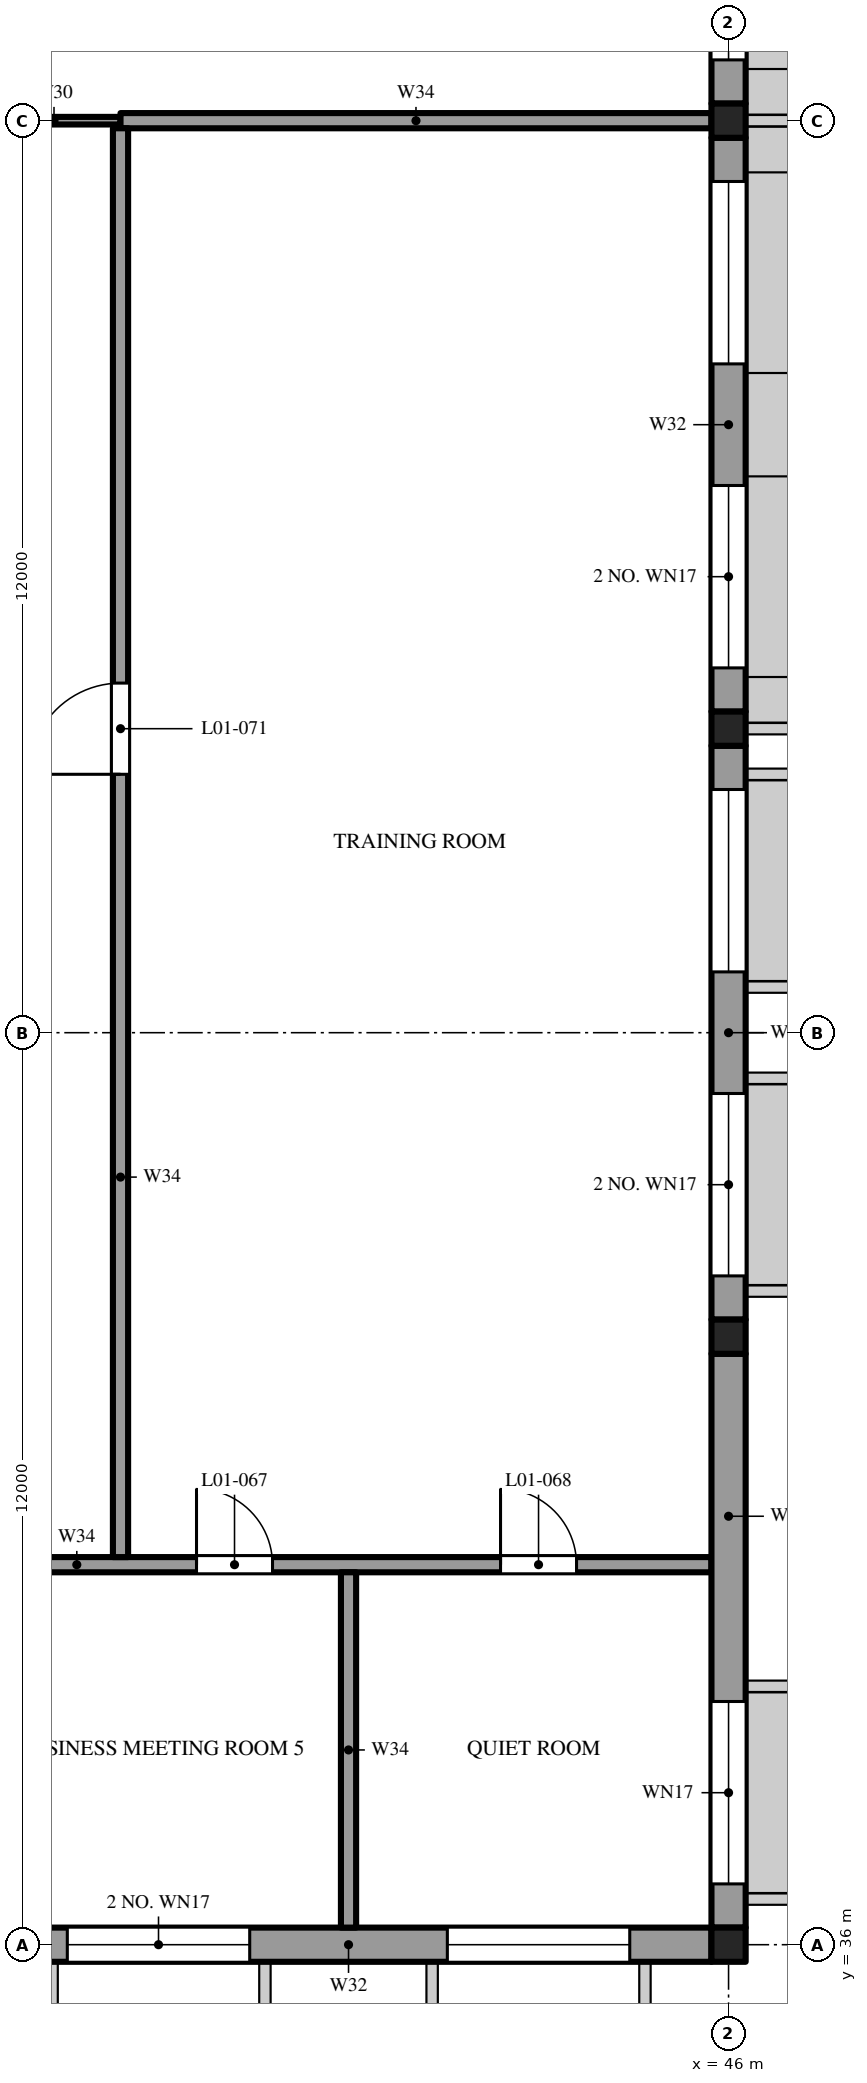
"""IFC4 building model, lengths in metres.
Left out: names, types, materials, properties, quantities, classifications, styles, units other than length and angle.
Written with IfcOpenShell. Run it as: python <this file> out.ifc"""

import sys

from ifc_helpers import new_model, si_unit, direction, frame, frame_2d, origin, origin_2d, place, context, subcontext, project, spatial, rectangle, extrude, element, fill, save


model = new_model("IFC4")
c1 = context("Model", 3, precision=1e-05, world=origin(), true_north=direction((0.0, 1.0)))
c2 = subcontext(c1, "Body", "Model", "MODEL_VIEW")
j1 = project(units=[si_unit("LENGTHUNIT", "METRE"), si_unit("PLANEANGLEUNIT", "RADIAN")], contexts=[c1])
p1 = place(None, origin())
s1 = spatial("IfcSite", under=j1, at=p1, CompositionType="ELEMENT")
p2 = place(p1, origin())
s2 = spatial("IfcBuilding", under=s1, at=p2, CompositionType="ELEMENT")
p3 = place(p2, frame((0.0, 0.0, 7.2)))
s3 = spatial("IfcBuildingStorey", under=s2, at=p3, CompositionType="ELEMENT", Elevation=7.2)
for number, where, z_axis, x_axis in (
    (1, (46.0, 36.0, 0.0), (0.0, 0.0, 1.0), (1.0, 0.0, 0.0)),
    (2, (46.0, 44.0, 0.0), (0.0, 0.0, 1.0), (1.0, 0.0, 0.0)),
    (3, (46.0, 52.0, 0.0), (0.0, 0.0, 1.0), (1.0, 0.0, 0.0)),
    (4, (46.0, 60.0, 0.0), (0.0, 0.0, 1.0), (1.0, 0.0, 0.0)),
):
    element("IfcColumn", number, at=place(p3, frame(where, z_axis=z_axis, x_axis=x_axis)), inside=s3, PredefinedType="COLUMN", context=c2, shape_type="SweptSolid", body=[
        extrude(rectangle(XDim=0.45, YDim=0.45, at=origin_2d()), origin(), (0.0, 0.0, 1.0), 4.8),
    ])
p4 = place(p3, frame((36.225, 36.0, 0.0), z_axis=(0.0, 0.0, 1.0), x_axis=(1.0, 0.0, 0.0)))
e5 = element("IfcWall", 5, at=p4, inside=s3, PredefinedType="SOLIDWALL", context=c2, shape_type="SweptSolid", body=[
    extrude(rectangle(XDim=9.55, YDim=0.45, at=frame_2d((4.775, 0.0))), origin(), (0.0, 0.0, 1.0), 4.45),
])
p5 = place(p4, frame((1.075, 0.0, 0.9)))
e6 = element("IfcOpeningElement", 6, at=p5, cuts=e5, PredefinedType="OPENING", context=c2, shape_type="SweptSolid", body=[
    extrude(rectangle(XDim=2.4, YDim=2.2, at=frame_2d((1.2, 1.1))), frame((0.0, 0.235, 0.0), z_axis=(0.0, -1.0, 0.0), x_axis=(1.0, 0.0, 0.0)), (0.0, 0.0, 1.0), 0.47),
])
p6 = place(p4, frame((6.075, 0.0, 0.9)))
e7 = element("IfcOpeningElement", 7, at=p6, cuts=e5, PredefinedType="OPENING", context=c2, shape_type="SweptSolid", body=[
    extrude(rectangle(XDim=2.4, YDim=2.2, at=frame_2d((1.2, 1.1))), frame((0.0, 0.235, 0.0), z_axis=(0.0, -1.0, 0.0), x_axis=(1.0, 0.0, 0.0)), (0.0, 0.0, 1.0), 0.47),
])
p7 = place(p3, frame((36.15, 41.0, 0.0), z_axis=(0.0, 0.0, 1.0), x_axis=(1.0, 0.0, 0.0)))
e8 = element("IfcWall", 8, at=p7, inside=s3, PredefinedType="PARTITIONING", context=c2, shape_type="SweptSolid", body=[
    extrude(rectangle(XDim=9.625, YDim=0.2, at=frame_2d((4.812, 0.0))), origin(), (0.0, 0.0, 1.0), 4.45),
])
p8 = place(p7, frame((2.85, 0.0, 0.0)))
e9 = element("IfcOpeningElement", 9, at=p8, cuts=e8, PredefinedType="OPENING", context=c2, shape_type="SweptSolid", body=[
    extrude(rectangle(XDim=1.0, YDim=2.1, at=frame_2d((0.5, 1.05))), frame((0.0, 0.11, 0.0), z_axis=(0.0, -1.0, 0.0), x_axis=(1.0, 0.0, 0.0)), (0.0, 0.0, 1.0), 0.22),
])
p9 = place(p7, frame((6.85, 0.0, 0.0)))
e10 = element("IfcOpeningElement", 10, at=p9, cuts=e8, PredefinedType="OPENING", context=c2, shape_type="SweptSolid", body=[
    extrude(rectangle(XDim=1.0, YDim=2.1, at=frame_2d((0.5, 1.05))), frame((0.0, 0.11, 0.0), z_axis=(0.0, -1.0, 0.0), x_axis=(1.0, 0.0, 0.0)), (0.0, 0.0, 1.0), 0.22),
])
p10 = place(p3, frame((36.25, 60.0, 0.0), z_axis=(0.0, 0.0, 1.0), x_axis=(1.0, 0.0, 0.0)))
e11 = element("IfcWall", 11, at=p10, inside=s3, PredefinedType="PARTITIONING", context=c2, shape_type="SweptSolid", body=[
    extrude(rectangle(XDim=1.75, YDim=0.1, at=frame_2d((0.875, 0.0))), origin(), (0.0, 0.0, 1.0), 4.45),
])
p11 = place(p3, frame((38.0, 60.0, 0.0), z_axis=(0.0, 0.0, 1.0), x_axis=(1.0, 0.0, 0.0)))
e12 = element("IfcWall", 12, at=p11, inside=s3, PredefinedType="PARTITIONING", context=c2, shape_type="SweptSolid", body=[
    extrude(rectangle(XDim=7.775, YDim=0.2, at=frame_2d((3.887, 0.0))), origin(), (0.0, 0.0, 1.0), 4.45),
])
p12 = place(p3, frame((38.0, 41.1, 0.0), z_axis=(0.0, 0.0, 1.0), x_axis=(0.0, 1.0, 0.0)))
e13 = element("IfcWall", 13, at=p12, inside=s3, PredefinedType="PARTITIONING", context=c2, shape_type="SweptSolid", body=[
    extrude(rectangle(XDim=18.8, YDim=0.2, at=frame_2d((9.4, 0.0))), origin(), (0.0, 0.0, 1.0), 4.45),
])
p13 = place(p12, frame((10.3, 0.0, 0.0)))
e14 = element("IfcOpeningElement", 14, at=p13, cuts=e13, PredefinedType="OPENING", context=c2, shape_type="SweptSolid", body=[
    extrude(rectangle(XDim=1.2, YDim=2.1, at=frame_2d((0.6, 1.05))), frame((0.0, 0.11, 0.0), z_axis=(0.0, -1.0, 0.0), x_axis=(1.0, 0.0, 0.0)), (0.0, 0.0, 1.0), 0.22),
])
p14 = place(p3, frame((41.0, 36.225, 0.0), z_axis=(0.0, 0.0, 1.0), x_axis=(0.0, 1.0, 0.0)))
e15 = element("IfcWall", 15, at=p14, inside=s3, PredefinedType="PARTITIONING", context=c2, shape_type="SweptSolid", body=[
    extrude(rectangle(XDim=4.675, YDim=0.2, at=frame_2d((2.337, 0.0))), origin(), (0.0, 0.0, 1.0), 4.45),
])
p15 = place(p3, frame((46.0, 36.225, 0.0), z_axis=(0.0, 0.0, 1.0), x_axis=(0.0, 1.0, 0.0)))
e16 = element("IfcWall", 16, at=p15, inside=s3, PredefinedType="SOLIDWALL", context=c2, shape_type="SweptSolid", body=[
    extrude(rectangle(XDim=7.55, YDim=0.45, at=frame_2d((3.775, 0.0))), origin(), (0.0, 0.0, 1.0), 4.45),
])
p16 = place(p15, frame((0.575, 0.0, 0.9)))
e17 = element("IfcOpeningElement", 17, at=p16, cuts=e16, PredefinedType="OPENING", context=c2, shape_type="SweptSolid", body=[
    extrude(rectangle(XDim=2.4, YDim=2.2, at=frame_2d((1.2, 1.1))), frame((0.0, 0.235, 0.0), z_axis=(0.0, -1.0, 0.0), x_axis=(1.0, 0.0, 0.0)), (0.0, 0.0, 1.0), 0.47),
])
p17 = place(p3, frame((46.0, 44.225, 0.0), z_axis=(0.0, 0.0, 1.0), x_axis=(0.0, 1.0, 0.0)))
e18 = element("IfcWall", 18, at=p17, inside=s3, PredefinedType="SOLIDWALL", context=c2, shape_type="SweptSolid", body=[
    extrude(rectangle(XDim=7.55, YDim=0.45, at=frame_2d((3.775, 0.0))), origin(), (0.0, 0.0, 1.0), 4.45),
])
p18 = place(p17, frame((0.575, 0.0, 0.9)))
e19 = element("IfcOpeningElement", 19, at=p18, cuts=e18, PredefinedType="OPENING", context=c2, shape_type="SweptSolid", body=[
    extrude(rectangle(XDim=2.4, YDim=2.2, at=frame_2d((1.2, 1.1))), frame((0.0, 0.235, 0.0), z_axis=(0.0, -1.0, 0.0), x_axis=(1.0, 0.0, 0.0)), (0.0, 0.0, 1.0), 0.47),
])
p19 = place(p17, frame((4.575, 0.0, 0.9)))
e20 = element("IfcOpeningElement", 20, at=p19, cuts=e18, PredefinedType="OPENING", context=c2, shape_type="SweptSolid", body=[
    extrude(rectangle(XDim=2.4, YDim=2.2, at=frame_2d((1.2, 1.1))), frame((0.0, 0.235, 0.0), z_axis=(0.0, -1.0, 0.0), x_axis=(1.0, 0.0, 0.0)), (0.0, 0.0, 1.0), 0.47),
])
p20 = place(p3, frame((46.0, 52.225, 0.0), z_axis=(0.0, 0.0, 1.0), x_axis=(0.0, 1.0, 0.0)))
e21 = element("IfcWall", 21, at=p20, inside=s3, PredefinedType="SOLIDWALL", context=c2, shape_type="SweptSolid", body=[
    extrude(rectangle(XDim=7.55, YDim=0.45, at=frame_2d((3.775, 0.0))), origin(), (0.0, 0.0, 1.0), 4.45),
])
p21 = place(p20, frame((0.575, 0.0, 0.9)))
e22 = element("IfcOpeningElement", 22, at=p21, cuts=e21, PredefinedType="OPENING", context=c2, shape_type="SweptSolid", body=[
    extrude(rectangle(XDim=2.4, YDim=2.2, at=frame_2d((1.2, 1.1))), frame((0.0, 0.235, 0.0), z_axis=(0.0, -1.0, 0.0), x_axis=(1.0, 0.0, 0.0)), (0.0, 0.0, 1.0), 0.47),
])
p22 = place(p20, frame((4.575, 0.0, 0.9)))
e23 = element("IfcOpeningElement", 23, at=p22, cuts=e21, PredefinedType="OPENING", context=c2, shape_type="SweptSolid", body=[
    extrude(rectangle(XDim=2.4, YDim=2.2, at=frame_2d((1.2, 1.1))), frame((0.0, 0.235, 0.0), z_axis=(0.0, -1.0, 0.0), x_axis=(1.0, 0.0, 0.0)), (0.0, 0.0, 1.0), 0.47),
])
p23 = place(p3, frame((46.0, 60.225, 0.0), z_axis=(0.0, 0.0, 1.0), x_axis=(0.0, 1.0, 0.0)))
e24 = element("IfcWall", 24, at=p23, inside=s3, PredefinedType="SOLIDWALL", context=c2, shape_type="SweptSolid", body=[
    extrude(rectangle(XDim=7.55, YDim=0.45, at=frame_2d((3.775, 0.0))), origin(), (0.0, 0.0, 1.0), 4.45),
])
p24 = place(p23, frame((0.575, 0.0, 0.9)))
e25 = element("IfcOpeningElement", 25, at=p24, cuts=e24, PredefinedType="OPENING", context=c2, shape_type="SweptSolid", body=[
    extrude(rectangle(XDim=2.4, YDim=2.2, at=frame_2d((1.2, 1.1))), frame((0.0, 0.235, 0.0), z_axis=(0.0, -1.0, 0.0), x_axis=(1.0, 0.0, 0.0)), (0.0, 0.0, 1.0), 0.47),
])
p25 = place(p23, frame((4.575, 0.0, 0.9)))
e26 = element("IfcOpeningElement", 26, at=p25, cuts=e24, PredefinedType="OPENING", context=c2, shape_type="SweptSolid", body=[
    extrude(rectangle(XDim=2.4, YDim=2.2, at=frame_2d((1.2, 1.1))), frame((0.0, 0.235, 0.0), z_axis=(0.0, -1.0, 0.0), x_axis=(1.0, 0.0, 0.0)), (0.0, 0.0, 1.0), 0.47),
])
p26 = place(p8, origin())
e27 = element("IfcDoor", 27, at=p26, inside=s3, OperationType="SINGLE_SWING_RIGHT", PredefinedType="DOOR", context=c2, shape_type="SweptSolid", body=[
    extrude(rectangle(XDim=1.0, YDim=2.1, at=frame_2d((0.5, 1.05))), frame((0.0, 0.025, 0.0), z_axis=(0.0, -1.0, 0.0), x_axis=(1.0, 0.0, 0.0)), (0.0, 0.0, 1.0), 0.05),
])
fill(e9, e27)
p27 = place(p9, origin())
e28 = element("IfcDoor", 28, at=p27, inside=s3, OperationType="SINGLE_SWING_LEFT", PredefinedType="DOOR", context=c2, shape_type="SweptSolid", body=[
    extrude(rectangle(XDim=1.0, YDim=2.1, at=frame_2d((0.5, 1.05))), frame((0.0, 0.025, 0.0), z_axis=(0.0, -1.0, 0.0), x_axis=(1.0, 0.0, 0.0)), (0.0, 0.0, 1.0), 0.05),
])
fill(e10, e28)
p28 = place(p13, origin())
e29 = element("IfcDoor", 29, at=p28, inside=s3, OperationType="SINGLE_SWING_RIGHT", PredefinedType="DOOR", context=c2, shape_type="SweptSolid", body=[
    extrude(rectangle(XDim=1.2, YDim=2.1, at=frame_2d((0.6, 1.05))), frame((0.0, 0.025, 0.0), z_axis=(0.0, -1.0, 0.0), x_axis=(1.0, 0.0, 0.0)), (0.0, 0.0, 1.0), 0.05),
])
fill(e14, e29)
p29 = place(p5, origin())
e30 = element("IfcWindow", 30, at=p29, inside=s3, PartitioningType="SINGLE_PANEL", PredefinedType="WINDOW", context=c2, shape_type="SweptSolid", body=[
    extrude(rectangle(XDim=2.4, YDim=2.2, at=frame_2d((1.2, 1.1))), frame((0.0, 0.215, 0.0), z_axis=(0.0, -1.0, 0.0), x_axis=(1.0, 0.0, 0.0)), (0.0, 0.0, 1.0), 0.06),
])
fill(e6, e30)
p30 = place(p6, origin())
e31 = element("IfcWindow", 31, at=p30, inside=s3, PartitioningType="SINGLE_PANEL", PredefinedType="WINDOW", context=c2, shape_type="SweptSolid", body=[
    extrude(rectangle(XDim=2.4, YDim=2.2, at=frame_2d((1.2, 1.1))), frame((0.0, 0.215, 0.0), z_axis=(0.0, -1.0, 0.0), x_axis=(1.0, 0.0, 0.0)), (0.0, 0.0, 1.0), 0.06),
])
fill(e7, e31)
p31 = place(p16, origin())
e32 = element("IfcWindow", 32, at=p31, inside=s3, PartitioningType="SINGLE_PANEL", PredefinedType="WINDOW", context=c2, shape_type="SweptSolid", body=[
    extrude(rectangle(XDim=2.4, YDim=2.2, at=frame_2d((1.2, 1.1))), frame((0.0, 0.215, 0.0), z_axis=(0.0, -1.0, 0.0), x_axis=(1.0, 0.0, 0.0)), (0.0, 0.0, 1.0), 0.06),
])
fill(e17, e32)
p32 = place(p18, origin())
e33 = element("IfcWindow", 33, at=p32, inside=s3, PartitioningType="SINGLE_PANEL", PredefinedType="WINDOW", context=c2, shape_type="SweptSolid", body=[
    extrude(rectangle(XDim=2.4, YDim=2.2, at=frame_2d((1.2, 1.1))), frame((0.0, 0.215, 0.0), z_axis=(0.0, -1.0, 0.0), x_axis=(1.0, 0.0, 0.0)), (0.0, 0.0, 1.0), 0.06),
])
fill(e19, e33)
p33 = place(p19, origin())
e34 = element("IfcWindow", 34, at=p33, inside=s3, PartitioningType="SINGLE_PANEL", PredefinedType="WINDOW", context=c2, shape_type="SweptSolid", body=[
    extrude(rectangle(XDim=2.4, YDim=2.2, at=frame_2d((1.2, 1.1))), frame((0.0, 0.215, 0.0), z_axis=(0.0, -1.0, 0.0), x_axis=(1.0, 0.0, 0.0)), (0.0, 0.0, 1.0), 0.06),
])
fill(e20, e34)
p34 = place(p21, origin())
e35 = element("IfcWindow", 35, at=p34, inside=s3, PartitioningType="SINGLE_PANEL", PredefinedType="WINDOW", context=c2, shape_type="SweptSolid", body=[
    extrude(rectangle(XDim=2.4, YDim=2.2, at=frame_2d((1.2, 1.1))), frame((0.0, 0.215, 0.0), z_axis=(0.0, -1.0, 0.0), x_axis=(1.0, 0.0, 0.0)), (0.0, 0.0, 1.0), 0.06),
])
fill(e22, e35)
p35 = place(p22, origin())
e36 = element("IfcWindow", 36, at=p35, inside=s3, PartitioningType="SINGLE_PANEL", PredefinedType="WINDOW", context=c2, shape_type="SweptSolid", body=[
    extrude(rectangle(XDim=2.4, YDim=2.2, at=frame_2d((1.2, 1.1))), frame((0.0, 0.215, 0.0), z_axis=(0.0, -1.0, 0.0), x_axis=(1.0, 0.0, 0.0)), (0.0, 0.0, 1.0), 0.06),
])
fill(e23, e36)
p36 = place(p24, origin())
e37 = element("IfcWindow", 37, at=p36, inside=s3, PartitioningType="SINGLE_PANEL", PredefinedType="WINDOW", context=c2, shape_type="SweptSolid", body=[
    extrude(rectangle(XDim=2.4, YDim=2.2, at=frame_2d((1.2, 1.1))), frame((0.0, 0.215, 0.0), z_axis=(0.0, -1.0, 0.0), x_axis=(1.0, 0.0, 0.0)), (0.0, 0.0, 1.0), 0.06),
])
fill(e25, e37)
save(model, sys.argv[1])
